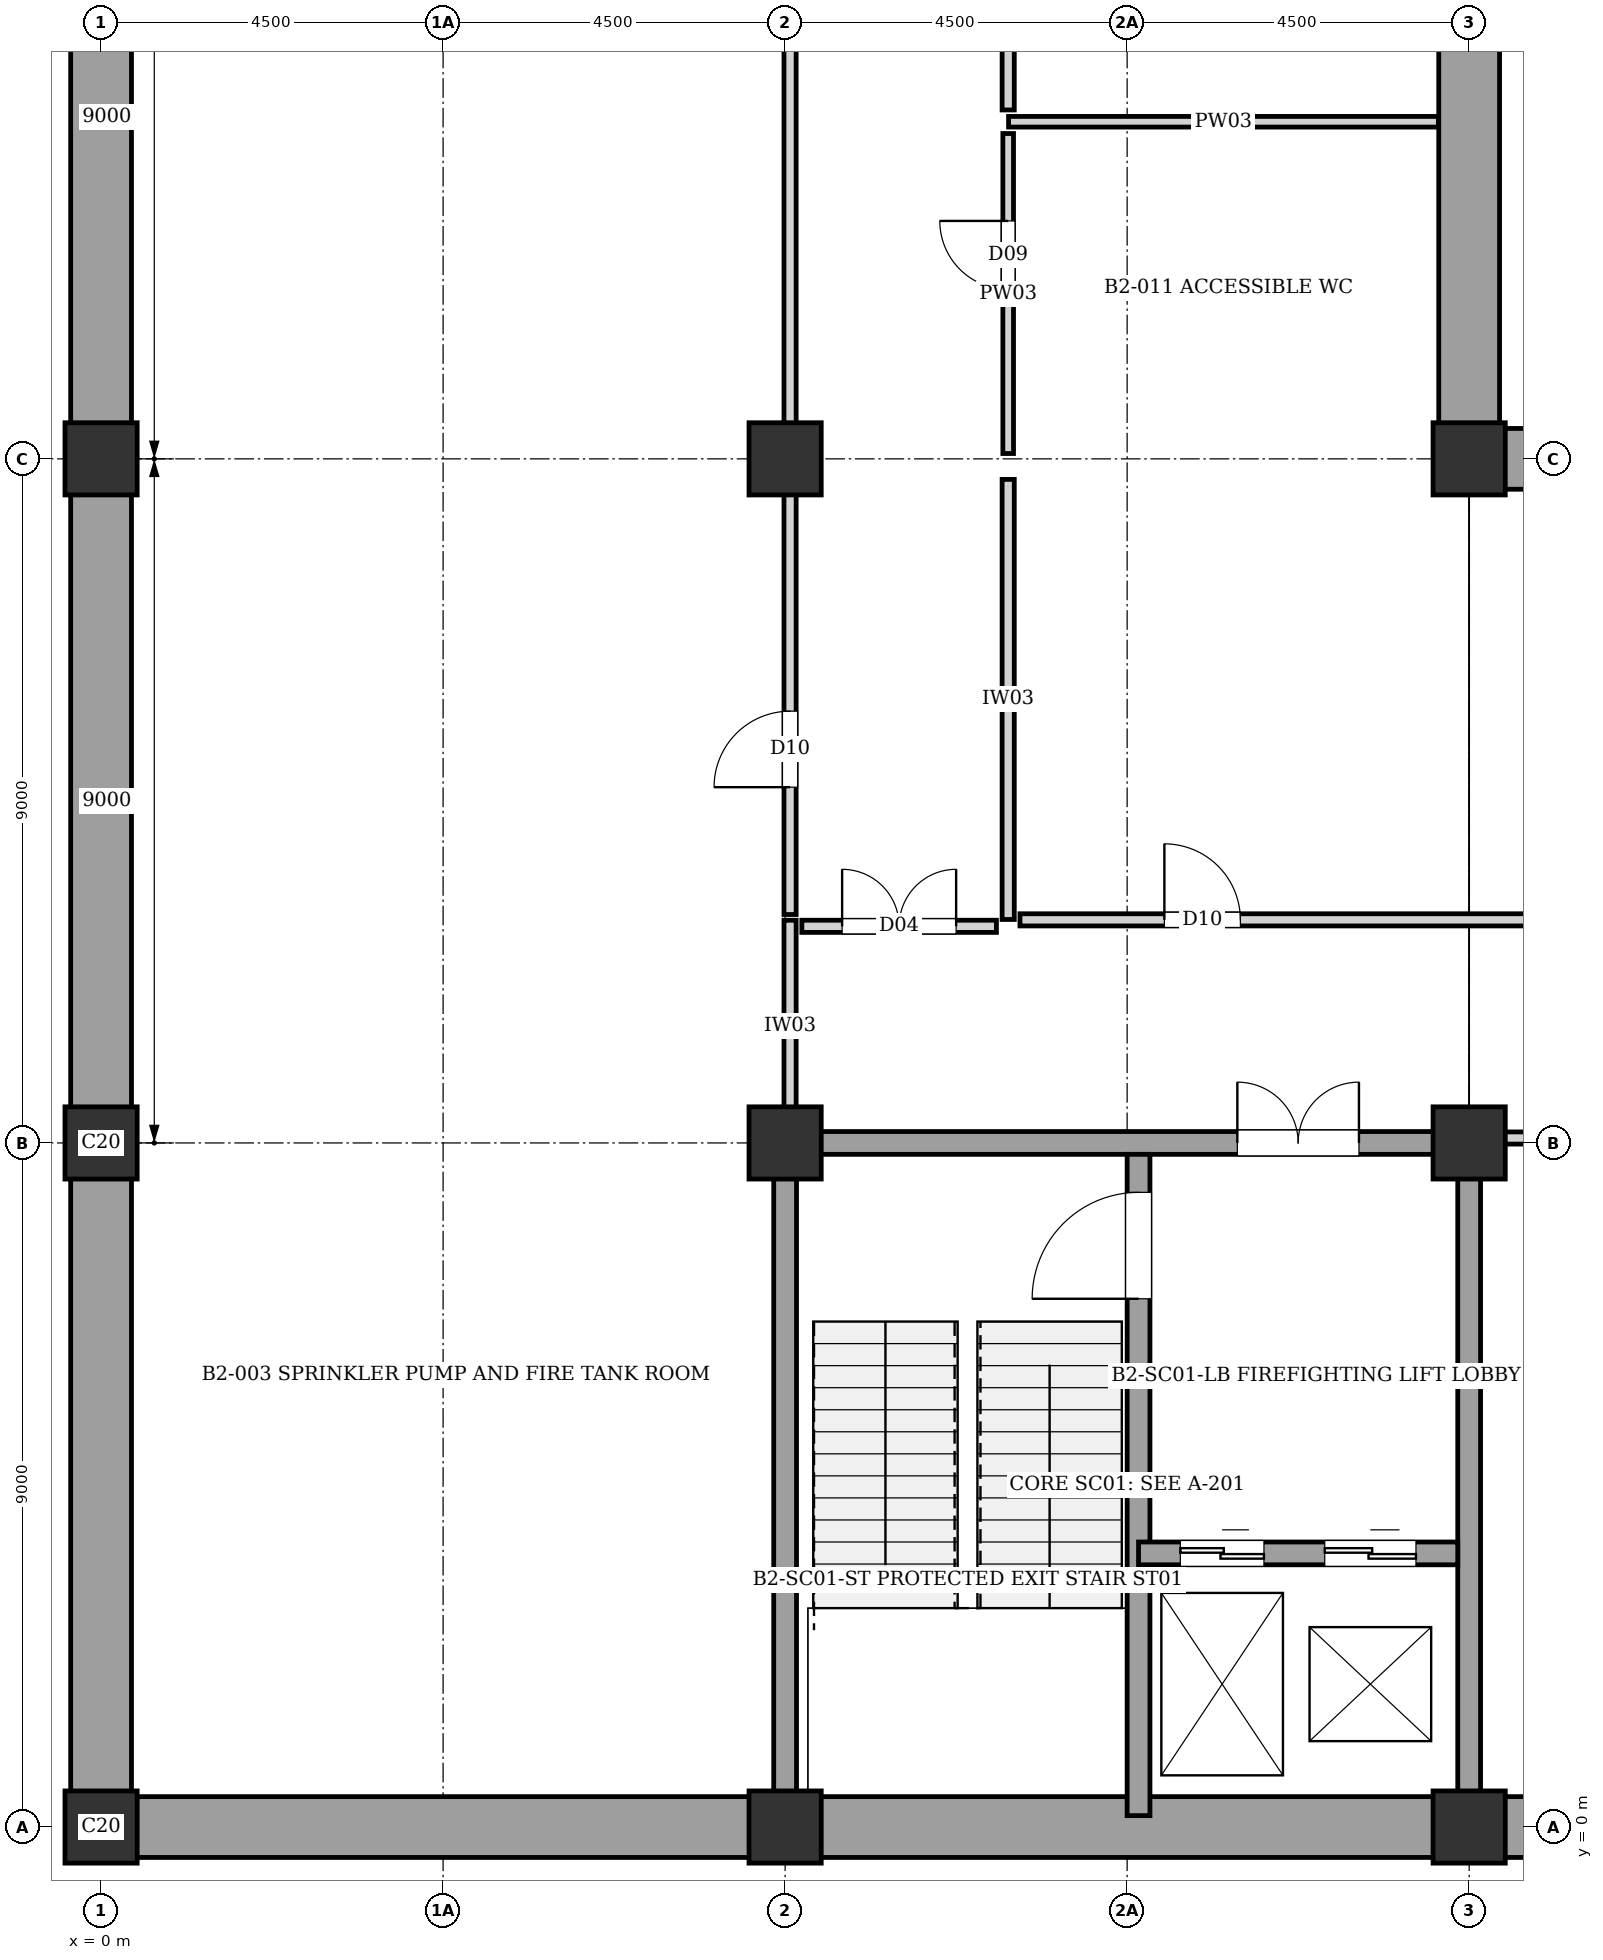
"""IFC4 building model, lengths in metres.
Left out: names, types, materials, properties, quantities, classifications, styles, units other than length and angle.
Written with IfcOpenShell. Run it as: python <this file> out.ifc"""

import sys

from ifc_helpers import new_model, si_unit, direction, frame, frame_2d, origin, origin_2d, place, context, subcontext, project, spatial, rectangle, extrude, element, fill, save


model = new_model("IFC4")
c1 = context("Model", 3, precision=1e-05, world=origin(), true_north=direction((0.0, 1.0)))
c2 = subcontext(c1, "Body", "Model", "MODEL_VIEW")
j1 = project(units=[si_unit("LENGTHUNIT", "METRE"), si_unit("PLANEANGLEUNIT", "RADIAN")], contexts=[c1])
p1 = place(None, origin())
s1 = spatial("IfcSite", under=j1, at=p1, CompositionType="ELEMENT")
p2 = place(p1, origin())
s2 = spatial("IfcBuilding", under=s1, at=p2, CompositionType="ELEMENT")
p3 = place(p2, frame((0.0, 0.0, -8.96)))
s3 = spatial("IfcBuildingStorey", under=s2, at=p3, CompositionType="ELEMENT", Elevation=-8.96)
for number, where, z_axis, x_axis in (
    (1, (0.0, 0.0, 0.0), (0.0, 0.0, 1.0), (1.0, 0.0, 0.0)),
    (2, (0.0, 9.0, 0.0), (0.0, 0.0, 1.0), (1.0, 0.0, 0.0)),
    (3, (0.0, 18.0, 0.0), (0.0, 0.0, 1.0), (1.0, 0.0, 0.0)),
    (4, (9.0, 0.0, 0.0), (0.0, 0.0, 1.0), (1.0, 0.0, 0.0)),
    (5, (9.0, 9.0, 0.0), (0.0, 0.0, 1.0), (1.0, 0.0, 0.0)),
    (6, (9.0, 18.0, 0.0), (0.0, 0.0, 1.0), (1.0, 0.0, 0.0)),
    (7, (18.0, 0.0, 0.0), (0.0, 0.0, 1.0), (1.0, 0.0, 0.0)),
    (8, (18.0, 9.0, 0.0), (0.0, 0.0, 1.0), (1.0, 0.0, 0.0)),
    (9, (18.0, 18.0, 0.0), (0.0, 0.0, 1.0), (1.0, 0.0, 0.0)),
):
    element("IfcColumn", number, at=place(p3, frame(where, z_axis=z_axis, x_axis=x_axis)), inside=s3, PredefinedType="COLUMN", context=c2, shape_type="SweptSolid", body=[
        extrude(rectangle(XDim=0.95, YDim=0.95, at=origin_2d()), origin(), (0.0, 0.0, 1.0), 4.48),
    ])
for number, where, z_axis, x_axis in (
    (10, (27.0, 0.0, 0.0), (0.0, 0.0, 1.0), (-1.0, 0.0, 0.0)),
    (11, (18.0, 0.0, 0.0), (0.0, 0.0, 1.0), (-1.0, 0.0, 0.0)),
    (12, (9.0, 0.0, 0.0), (0.0, 0.0, 1.0), (-1.0, 0.0, 0.0)),
    (13, (0.0, 0.0, 0.0), (0.0, 0.0, 1.0), (0.0, 1.0, 0.0)),
    (14, (0.0, 9.0, 0.0), (0.0, 0.0, 1.0), (0.0, 1.0, 0.0)),
    (15, (0.0, 18.0, 0.0), (0.0, 0.0, 1.0), (0.0, 1.0, 0.0)),
    (16, (18.0, 27.0, 0.0), (0.0, 0.0, 1.0), (0.0, -1.0, 0.0)),
    (17, (18.0, 18.0, 0.0), (0.0, 0.0, 1.0), (1.0, 0.0, 0.0)),
):
    element("IfcWall", number, at=place(p3, frame(where, z_axis=z_axis, x_axis=x_axis)), inside=s3, PredefinedType="USERDEFINED", context=c2, shape_type="SweptSolid", body=[
        extrude(rectangle(XDim=9.0, YDim=0.8, at=frame_2d((4.5, 0.0))), origin(), (0.0, 0.0, 1.0), 4.2),
    ])
p4 = place(p3, frame((18.0, 0.0, 0.0), z_axis=(0.0, 0.0, 1.0), x_axis=(0.0, 1.0, 0.0)))
e18 = element("IfcWall", 18, at=p4, inside=s3, PredefinedType="SHEAR", context=c2, shape_type="SweptSolid", body=[
    extrude(rectangle(XDim=9.0, YDim=0.3, at=frame_2d((4.5, 0.0))), origin(), (0.0, 0.0, 1.0), 4.2),
])
p5 = place(p3, frame((9.0, 9.0, 0.0), z_axis=(0.0, 0.0, 1.0), x_axis=(1.0, 0.0, 0.0)))
e19 = element("IfcWall", 19, at=p5, inside=s3, PredefinedType="SHEAR", context=c2, shape_type="SweptSolid", body=[
    extrude(rectangle(XDim=9.0, YDim=0.3, at=frame_2d((4.5, 0.0))), origin(), (0.0, 0.0, 1.0), 4.2),
])
p6 = place(p5, frame((5.95, 0.0, 0.0)))
e20 = element("IfcOpeningElement", 20, at=p6, cuts=e19, PredefinedType="OPENING", context=c2, shape_type="SweptSolid", body=[
    extrude(rectangle(XDim=1.6, YDim=2.1, at=frame_2d((0.8, 1.05))), frame((0.0, 0.16, 0.0), z_axis=(0.0, -1.0, 0.0), x_axis=(1.0, 0.0, 0.0)), (0.0, 0.0, 1.0), 0.32),
])
p7 = place(p3, frame((9.0, 0.0, 0.0), z_axis=(0.0, 0.0, 1.0), x_axis=(0.0, 1.0, 0.0)))
e21 = element("IfcWall", 21, at=p7, inside=s3, PredefinedType="SHEAR", context=c2, shape_type="SweptSolid", body=[
    extrude(rectangle(XDim=9.0, YDim=0.3, at=frame_2d((4.5, 0.0))), origin(), (0.0, 0.0, 1.0), 4.2),
])
p8 = place(p3, frame((13.65, 0.15, 0.0), z_axis=(0.0, 0.0, 1.0), x_axis=(0.0, 1.0, 0.0)))
e22 = element("IfcWall", 22, at=p8, inside=s3, PredefinedType="SHEAR", context=c2, shape_type="SweptSolid", body=[
    extrude(rectangle(XDim=8.7, YDim=0.3, at=frame_2d((4.35, 0.0))), origin(), (0.0, 0.0, 1.0), 4.2),
])
p9 = place(p8, frame((6.8, 0.0, 0.0)))
e23 = element("IfcOpeningElement", 23, at=p9, cuts=e22, PredefinedType="OPENING", context=c2, shape_type="SweptSolid", body=[
    extrude(rectangle(XDim=1.4, YDim=2.02, at=frame_2d((0.7, 1.01))), frame((0.0, 0.16, 0.0), z_axis=(0.0, -1.0, 0.0), x_axis=(1.0, 0.0, 0.0)), (0.0, 0.0, 1.0), 0.32),
])
p10 = place(p3, frame((13.65, 3.6, 0.0), z_axis=(0.0, 0.0, 1.0), x_axis=(1.0, 0.0, 0.0)))
e24 = element("IfcWall", 24, at=p10, inside=s3, PredefinedType="SHEAR", context=c2, shape_type="SweptSolid", body=[
    extrude(rectangle(XDim=4.2, YDim=0.3, at=frame_2d((2.1, 0.0))), origin(), (0.0, 0.0, 1.0), 4.2),
])
p11 = place(p10, frame((0.55, 0.0, 0.0)))
e25 = element("IfcOpeningElement", 25, at=p11, cuts=e24, PredefinedType="OPENING", context=c2, shape_type="SweptSolid", body=[
    extrude(rectangle(XDim=1.1, YDim=2.1, at=frame_2d((0.55, 1.05))), frame((0.0, 0.16, 0.0), z_axis=(0.0, -1.0, 0.0), x_axis=(1.0, 0.0, 0.0)), (0.0, 0.0, 1.0), 0.32),
])
p12 = place(p10, frame((2.45, 0.0, 0.0)))
e26 = element("IfcOpeningElement", 26, at=p12, cuts=e24, PredefinedType="OPENING", context=c2, shape_type="SweptSolid", body=[
    extrude(rectangle(XDim=1.2, YDim=2.2, at=frame_2d((0.6, 1.1))), frame((0.0, 0.16, 0.0), z_axis=(0.0, -1.0, 0.0), x_axis=(1.0, 0.0, 0.0)), (0.0, 0.0, 1.0), 0.32),
])
p13 = place(p3, frame((9.065, 9.155, 0.0), z_axis=(0.0, 0.0, 1.0), x_axis=(0.0, 1.0, 0.0)))
e27 = element("IfcWall", 27, at=p13, inside=s3, PredefinedType="PARTITIONING", context=c2, shape_type="SweptSolid", body=[
    extrude(rectangle(XDim=2.775, YDim=0.16, at=frame_2d((1.387, 0.0))), origin(), (0.0, 0.0, 1.0), 3.3),
])
p14 = place(p3, frame((11.935, 11.94, 0.0), z_axis=(0.0, 0.0, 1.0), x_axis=(0.0, 1.0, 0.0)))
e28 = element("IfcWall", 28, at=p14, inside=s3, PredefinedType="PARTITIONING", context=c2, shape_type="SweptSolid", body=[
    extrude(rectangle(XDim=5.79, YDim=0.16, at=frame_2d((2.895, 0.0))), origin(), (0.0, 0.0, 1.0), 4.2),
])
p15 = place(p3, frame((11.94, 22.435, 0.0), z_axis=(0.0, 0.0, 1.0), x_axis=(1.0, 0.0, 0.0)))
e29 = element("IfcWall", 29, at=p15, inside=s3, PredefinedType="PLUMBINGWALL", context=c2, shape_type="SweptSolid", body=[
    extrude(rectangle(XDim=5.655, YDim=0.14, at=frame_2d((2.828, 0.0))), origin(), (0.0, 0.0, 1.0), 4.2),
])
p16 = place(p3, frame((9.22, 11.85, 0.0), z_axis=(0.0, 0.0, 1.0), x_axis=(1.0, 0.0, 0.0)))
e30 = element("IfcWall", 30, at=p16, inside=s3, PredefinedType="PARTITIONING", context=c2, shape_type="SweptSolid", body=[
    extrude(rectangle(XDim=2.56, YDim=0.16, at=frame_2d((1.28, 0.0))), origin(), (0.0, 0.0, 1.0), 4.2),
])
p17 = place(p16, frame((0.53, 0.0, 0.0)))
e31 = element("IfcOpeningElement", 31, at=p17, cuts=e30, PredefinedType="OPENING", context=c2, shape_type="SweptSolid", body=[
    extrude(rectangle(XDim=1.5, YDim=2.1, at=frame_2d((0.75, 1.05))), frame((0.0, 0.09, 0.0), z_axis=(0.0, -1.0, 0.0), x_axis=(1.0, 0.0, 0.0)), (0.0, 0.0, 1.0), 0.18),
])
p18 = place(p3, frame((18.155, 9.065, 0.0), z_axis=(0.0, 0.0, 1.0), x_axis=(1.0, 0.0, 0.0)))
e32 = element("IfcWall", 32, at=p18, inside=s3, PredefinedType="PARTITIONING", context=c2, shape_type="SweptSolid", body=[
    extrude(rectangle(XDim=17.69, YDim=0.16, at=frame_2d((8.845, 0.0))), origin(), (0.0, 0.0, 1.0), 3.3),
])
p19 = place(p18, frame((1.9, 0.0, 0.0)))
e33 = element("IfcOpeningElement", 33, at=p19, cuts=e32, PredefinedType="OPENING", context=c2, shape_type="SweptSolid", body=[
    extrude(rectangle(XDim=1.0, YDim=2.1, at=frame_2d((0.5, 1.05))), frame((0.0, 0.09, 0.0), z_axis=(0.0, -1.0, 0.0), x_axis=(1.0, 0.0, 0.0)), (0.0, 0.0, 1.0), 0.18),
])
p20 = place(p3, frame((12.09, 11.935, 0.0), z_axis=(0.0, 0.0, 1.0), x_axis=(1.0, 0.0, 0.0)))
e34 = element("IfcWall", 34, at=p20, inside=s3, PredefinedType="PARTITIONING", context=c2, shape_type="SweptSolid", body=[
    extrude(rectangle(XDim=23.69, YDim=0.16, at=frame_2d((11.845, 0.0))), origin(), (0.0, 0.0, 1.0), 4.2),
])
p21 = place(p20, frame((1.9, 0.0, 0.0)))
e35 = element("IfcOpeningElement", 35, at=p21, cuts=e34, PredefinedType="OPENING", context=c2, shape_type="SweptSolid", body=[
    extrude(rectangle(XDim=1.0, YDim=2.1, at=frame_2d((0.5, 1.05))), frame((0.0, 0.09, 0.0), z_axis=(0.0, -1.0, 0.0), x_axis=(1.0, 0.0, 0.0)), (0.0, 0.0, 1.0), 0.18),
])
p22 = place(p3, frame((9.065, 12.005, 0.0), z_axis=(0.0, 0.0, 1.0), x_axis=(0.0, 1.0, 0.0)))
e36 = element("IfcWall", 36, at=p22, inside=s3, PredefinedType="PARTITIONING", context=c2, shape_type="SweptSolid", body=[
    extrude(rectangle(XDim=5.725, YDim=0.16, at=frame_2d((2.863, 0.0))), origin(), (0.0, 0.0, 1.0), 3.3),
])
p23 = place(p22, frame((1.676, 0.0, 0.0)))
e37 = element("IfcOpeningElement", 37, at=p23, cuts=e36, PredefinedType="OPENING", context=c2, shape_type="SweptSolid", body=[
    extrude(rectangle(XDim=1.0, YDim=2.1, at=frame_2d((0.5, 1.05))), frame((0.0, 0.09, 0.0), z_axis=(0.0, -1.0, 0.0), x_axis=(1.0, 0.0, 0.0)), (0.0, 0.0, 1.0), 0.18),
])
p24 = place(p3, frame((9.065, 18.07, 0.0), z_axis=(0.0, 0.0, 1.0), x_axis=(0.0, 1.0, 0.0)))
e38 = element("IfcWall", 38, at=p24, inside=s3, PredefinedType="PARTITIONING", context=c2, shape_type="SweptSolid", body=[
    extrude(rectangle(XDim=17.775, YDim=0.16, at=frame_2d((8.887, 0.0))), origin(), (0.0, 0.0, 1.0), 3.3),
])
p25 = place(p24, frame((14.875, 0.0, 0.0)))
e39 = element("IfcOpeningElement", 39, at=p25, cuts=e38, PredefinedType="OPENING", context=c2, shape_type="SweptSolid", body=[
    extrude(rectangle(XDim=1.0, YDim=2.1, at=frame_2d((0.5, 1.05))), frame((0.0, 0.09, 0.0), z_axis=(0.0, -1.0, 0.0), x_axis=(1.0, 0.0, 0.0)), (0.0, 0.0, 1.0), 0.18),
])
p26 = place(p3, frame((11.935, 18.07, 0.0), z_axis=(0.0, 0.0, 1.0), x_axis=(0.0, 1.0, 0.0)))
e40 = element("IfcWall", 40, at=p26, inside=s3, PredefinedType="PLUMBINGWALL", context=c2, shape_type="SweptSolid", body=[
    extrude(rectangle(XDim=4.21, YDim=0.14, at=frame_2d((2.105, 0.0))), origin(), (0.0, 0.0, 1.0), 4.2),
])
p27 = place(p26, frame((2.16, 0.0, 0.0)))
e41 = element("IfcOpeningElement", 41, at=p27, cuts=e40, PredefinedType="OPENING", context=c2, shape_type="SweptSolid", body=[
    extrude(rectangle(XDim=0.9, YDim=2.1, at=frame_2d((0.45, 1.05))), frame((0.0, 0.08, 0.0), z_axis=(0.0, -1.0, 0.0), x_axis=(1.0, 0.0, 0.0)), (0.0, 0.0, 1.0), 0.16),
])
p28 = place(p3, frame((11.935, 22.59, 0.0), z_axis=(0.0, 0.0, 1.0), x_axis=(0.0, 1.0, 0.0)))
e42 = element("IfcWall", 42, at=p28, inside=s3, PredefinedType="PARTITIONING", context=c2, shape_type="SweptSolid", body=[
    extrude(rectangle(XDim=22.19, YDim=0.16, at=frame_2d((11.095, 0.0))), origin(), (0.0, 0.0, 1.0), 4.2),
])
p29 = place(p28, frame((7.932, 0.0, 0.0)))
e43 = element("IfcOpeningElement", 43, at=p29, cuts=e42, PredefinedType="OPENING", context=c2, shape_type="SweptSolid", body=[
    extrude(rectangle(XDim=1.0, YDim=2.1, at=frame_2d((0.5, 1.05))), frame((0.0, 0.09, 0.0), z_axis=(0.0, -1.0, 0.0), x_axis=(1.0, 0.0, 0.0)), (0.0, 0.0, 1.0), 0.18),
])
p30 = place(p6, origin())
e44 = element("IfcDoor", 44, at=p30, inside=s3, OperationType="DOUBLE_DOOR_SINGLE_SWING", PredefinedType="DOOR", context=c2, shape_type="SweptSolid", body=[
    extrude(rectangle(XDim=1.6, YDim=2.1, at=frame_2d((0.8, 1.05))), frame((0.0, 0.025, 0.0), z_axis=(0.0, -1.0, 0.0), x_axis=(1.0, 0.0, 0.0)), (0.0, 0.0, 1.0), 0.05),
])
fill(e20, e44)
p31 = place(p9, origin())
e45 = element("IfcDoor", 45, at=p31, inside=s3, OperationType="SINGLE_SWING_LEFT", PredefinedType="DOOR", context=c2, shape_type="SweptSolid", body=[
    extrude(rectangle(XDim=1.4, YDim=2.02, at=frame_2d((0.7, 1.01))), frame((0.0, 0.025, 0.0), z_axis=(0.0, -1.0, 0.0), x_axis=(1.0, 0.0, 0.0)), (0.0, 0.0, 1.0), 0.05),
])
fill(e23, e45)
p32 = place(p11, origin())
e46 = element("IfcDoor", 46, at=p32, inside=s3, OperationType="DOUBLE_DOOR_SLIDING", PredefinedType="DOOR", context=c2, shape_type="SweptSolid", body=[
    extrude(rectangle(XDim=1.1, YDim=2.1, at=frame_2d((0.55, 1.05))), frame((0.0, 0.025, 0.0), z_axis=(0.0, -1.0, 0.0), x_axis=(1.0, 0.0, 0.0)), (0.0, 0.0, 1.0), 0.05),
])
fill(e25, e46)
p33 = place(p12, origin())
e47 = element("IfcDoor", 47, at=p33, inside=s3, OperationType="DOUBLE_DOOR_SLIDING", PredefinedType="DOOR", context=c2, shape_type="SweptSolid", body=[
    extrude(rectangle(XDim=1.2, YDim=2.2, at=frame_2d((0.6, 1.1))), frame((0.0, 0.025, 0.0), z_axis=(0.0, -1.0, 0.0), x_axis=(1.0, 0.0, 0.0)), (0.0, 0.0, 1.0), 0.05),
])
fill(e26, e47)
p34 = place(p17, origin())
e48 = element("IfcDoor", 48, at=p34, inside=s3, OperationType="DOUBLE_DOOR_SINGLE_SWING", PredefinedType="DOOR", context=c2, shape_type="SweptSolid", body=[
    extrude(rectangle(XDim=1.5, YDim=2.1, at=frame_2d((0.75, 1.05))), frame((0.0, 0.025, 0.0), z_axis=(0.0, -1.0, 0.0), x_axis=(1.0, 0.0, 0.0)), (0.0, 0.0, 1.0), 0.05),
])
fill(e31, e48)
p35 = place(p21, origin())
e49 = element("IfcDoor", 49, at=p35, inside=s3, OperationType="SINGLE_SWING_LEFT", PredefinedType="DOOR", context=c2, shape_type="SweptSolid", body=[
    extrude(rectangle(XDim=1.0, YDim=2.1, at=frame_2d((0.5, 1.05))), frame((0.0, 0.025, 0.0), z_axis=(0.0, -1.0, 0.0), x_axis=(1.0, 0.0, 0.0)), (0.0, 0.0, 1.0), 0.05),
])
fill(e35, e49)
p36 = place(p23, origin())
e50 = element("IfcDoor", 50, at=p36, inside=s3, OperationType="SINGLE_SWING_LEFT", PredefinedType="DOOR", context=c2, shape_type="SweptSolid", body=[
    extrude(rectangle(XDim=1.0, YDim=2.1, at=frame_2d((0.5, 1.05))), frame((0.0, 0.025, 0.0), z_axis=(0.0, -1.0, 0.0), x_axis=(1.0, 0.0, 0.0)), (0.0, 0.0, 1.0), 0.05),
])
fill(e37, e50)
p37 = place(p27, origin())
e51 = element("IfcDoor", 51, at=p37, inside=s3, OperationType="SINGLE_SWING_RIGHT", PredefinedType="DOOR", context=c2, shape_type="SweptSolid", body=[
    extrude(rectangle(XDim=0.9, YDim=2.1, at=frame_2d((0.45, 1.05))), frame((0.0, 0.025, 0.0), z_axis=(0.0, -1.0, 0.0), x_axis=(1.0, 0.0, 0.0)), (0.0, 0.0, 1.0), 0.05),
])
fill(e41, e51)
save(model, sys.argv[1])
